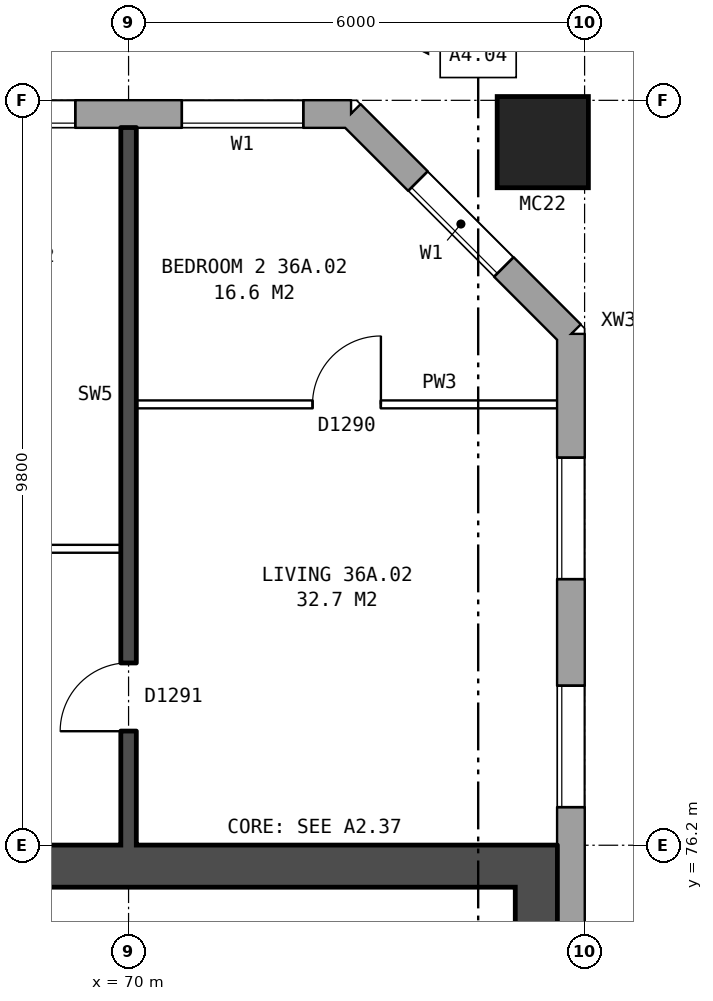
"""IFC4 building model, lengths in metres.
Left out: names, types, materials, properties, quantities, classifications, styles, units other than length and angle.
Written with IfcOpenShell. Run it as: python <this file> out.ifc"""

import sys

from ifc_helpers import new_model, si_unit, direction, frame, frame_2d, origin, origin_2d, place, context, subcontext, project, spatial, rectangle, hollow_rectangle, extrude, element, fill, save


model = new_model("IFC4")
c1 = context("Model", 3, precision=1e-05, world=origin(), true_north=direction((0.0, 1.0)))
c2 = subcontext(c1, "Body", "Model", "MODEL_VIEW")
j1 = project(units=[si_unit("LENGTHUNIT", "METRE"), si_unit("PLANEANGLEUNIT", "RADIAN")], contexts=[c1])
p1 = place(None, origin())
s1 = spatial("IfcSite", under=j1, at=p1, CompositionType="ELEMENT")
p2 = place(p1, origin())
s2 = spatial("IfcBuilding", under=s1, at=p2, CompositionType="ELEMENT")
p3 = place(p2, frame((0.0, 0.0, 129.9)))
s3 = spatial("IfcBuildingStorey", under=s2, at=p3, CompositionType="ELEMENT", Elevation=129.9)
p4 = place(p3, frame((75.45, 85.45, 0.0), z_axis=(0.0, 0.0, 1.0), x_axis=(1.0, 0.0, 0.0)))
e1 = element("IfcColumn", 1, at=p4, inside=s3, PredefinedType="COLUMN", context=c2, shape_type="SweptSolid", body=[
    extrude(hollow_rectangle(XDim=1.2, YDim=1.2, WallThickness=0.065, at=origin_2d()), origin(), (0.0, 0.0, 1.0), 3.1),
])
p5 = place(p3, frame((75.82, 57.075, 0.0), z_axis=(0.0, 0.0, 1.0), x_axis=(0.0, 1.0, 0.0)))
e2 = element("IfcWall", 2, at=p5, inside=s3, PredefinedType="STANDARD", context=c2, shape_type="SweptSolid", body=[
    extrude(rectangle(XDim=25.851, YDim=0.36, at=frame_2d((12.925, 0.0))), origin(), (0.0, 0.0, 1.0), 2.85),
])
p6 = place(p5, frame((1.625, 0.0, 0.8)))
e3 = element("IfcOpeningElement", 3, at=p6, cuts=e2, PredefinedType="OPENING", context=c2, shape_type="SweptSolid", body=[
    extrude(rectangle(XDim=1.6, YDim=1.8, at=frame_2d((0.8, 0.9))), frame((0.0, 0.19, 0.0), z_axis=(0.0, -1.0, 0.0), x_axis=(1.0, 0.0, 0.0)), (0.0, 0.0, 1.0), 0.38),
])
p7 = place(p5, frame((4.625, 0.0, 0.8)))
e4 = element("IfcOpeningElement", 4, at=p7, cuts=e2, PredefinedType="OPENING", context=c2, shape_type="SweptSolid", body=[
    extrude(rectangle(XDim=1.6, YDim=1.8, at=frame_2d((0.8, 0.9))), frame((0.0, 0.19, 0.0), z_axis=(0.0, -1.0, 0.0), x_axis=(1.0, 0.0, 0.0)), (0.0, 0.0, 1.0), 0.38),
])
p8 = place(p5, frame((19.625, 0.0, 0.8)))
e5 = element("IfcOpeningElement", 5, at=p8, cuts=e2, PredefinedType="OPENING", context=c2, shape_type="SweptSolid", body=[
    extrude(rectangle(XDim=1.6, YDim=1.8, at=frame_2d((0.8, 0.9))), frame((0.0, 0.19, 0.0), z_axis=(0.0, -1.0, 0.0), x_axis=(1.0, 0.0, 0.0)), (0.0, 0.0, 1.0), 0.38),
])
p9 = place(p5, frame((22.625, 0.0, 0.8)))
e6 = element("IfcOpeningElement", 6, at=p9, cuts=e2, PredefinedType="OPENING", context=c2, shape_type="SweptSolid", body=[
    extrude(rectangle(XDim=1.6, YDim=1.8, at=frame_2d((0.8, 0.9))), frame((0.0, 0.19, 0.0), z_axis=(0.0, -1.0, 0.0), x_axis=(1.0, 0.0, 0.0)), (0.0, 0.0, 1.0), 0.38),
])
p10 = place(p3, frame((75.82, 82.925, 0.0), z_axis=(0.0, 0.0, 1.0), x_axis=(-0.707106781187, 0.707106781187, 0.0)))
e7 = element("IfcWall", 7, at=p10, inside=s3, PredefinedType="STANDARD", context=c2, shape_type="SweptSolid", body=[
    extrude(rectangle(XDim=4.094, YDim=0.36, at=frame_2d((2.047, 0.0))), origin(), (0.0, 0.0, 1.0), 2.85),
])
p11 = place(p10, frame((1.247, 0.0, 0.8)))
e8 = element("IfcOpeningElement", 8, at=p11, cuts=e7, PredefinedType="OPENING", context=c2, shape_type="SweptSolid", body=[
    extrude(rectangle(XDim=1.6, YDim=1.8, at=frame_2d((0.8, 0.9))), frame((0.0, 0.19, 0.0), z_axis=(0.0, -1.0, 0.0), x_axis=(1.0, 0.0, 0.0)), (0.0, 0.0, 1.0), 0.38),
])
p12 = place(p3, frame((72.925, 85.82, 0.0), z_axis=(0.0, 0.0, 1.0), x_axis=(-1.0, 0.0, 0.0)))
e9 = element("IfcWall", 9, at=p12, inside=s3, PredefinedType="STANDARD", context=c2, shape_type="SweptSolid", body=[
    extrude(rectangle(XDim=43.101, YDim=0.36, at=frame_2d((21.55, 0.0))), origin(), (0.0, 0.0, 1.0), 2.85),
])
p13 = place(p12, frame((0.625, 0.0, 0.8)))
e10 = element("IfcOpeningElement", 10, at=p13, cuts=e9, PredefinedType="OPENING", context=c2, shape_type="SweptSolid", body=[
    extrude(rectangle(XDim=1.6, YDim=1.8, at=frame_2d((0.8, 0.9))), frame((0.0, 0.19, 0.0), z_axis=(0.0, -1.0, 0.0), x_axis=(1.0, 0.0, 0.0)), (0.0, 0.0, 1.0), 0.38),
])
p14 = place(p12, frame((3.625, 0.0, 0.8)))
e11 = element("IfcOpeningElement", 11, at=p14, cuts=e9, PredefinedType="OPENING", context=c2, shape_type="SweptSolid", body=[
    extrude(rectangle(XDim=1.6, YDim=1.8, at=frame_2d((0.8, 0.9))), frame((0.0, 0.19, 0.0), z_axis=(0.0, -1.0, 0.0), x_axis=(1.0, 0.0, 0.0)), (0.0, 0.0, 1.0), 0.38),
])
p15 = place(p12, frame((6.625, 0.0, 0.8)))
e12 = element("IfcOpeningElement", 12, at=p15, cuts=e9, PredefinedType="OPENING", context=c2, shape_type="SweptSolid", body=[
    extrude(rectangle(XDim=1.6, YDim=1.8, at=frame_2d((0.8, 0.9))), frame((0.0, 0.19, 0.0), z_axis=(0.0, -1.0, 0.0), x_axis=(1.0, 0.0, 0.0)), (0.0, 0.0, 1.0), 0.38),
])
p16 = place(p12, frame((10.175, 0.0, 0.15)))
e13 = element("IfcOpeningElement", 13, at=p16, cuts=e9, PredefinedType="OPENING", context=c2, shape_type="SweptSolid", body=[
    extrude(rectangle(XDim=0.6, YDim=0.9, at=frame_2d((0.3, 0.45))), frame((0.0, 0.19, 0.0), z_axis=(0.0, -1.0, 0.0), x_axis=(1.0, 0.0, 0.0)), (0.0, 0.0, 1.0), 0.38),
])
p17 = place(p12, frame((12.625, 0.0, 0.8)))
e14 = element("IfcOpeningElement", 14, at=p17, cuts=e9, PredefinedType="OPENING", context=c2, shape_type="SweptSolid", body=[
    extrude(rectangle(XDim=1.6, YDim=1.8, at=frame_2d((0.8, 0.9))), frame((0.0, 0.19, 0.0), z_axis=(0.0, -1.0, 0.0), x_axis=(1.0, 0.0, 0.0)), (0.0, 0.0, 1.0), 0.38),
])
p18 = place(p12, frame((15.625, 0.0, 0.8)))
e15 = element("IfcOpeningElement", 15, at=p18, cuts=e9, PredefinedType="OPENING", context=c2, shape_type="SweptSolid", body=[
    extrude(rectangle(XDim=1.6, YDim=1.8, at=frame_2d((0.8, 0.9))), frame((0.0, 0.19, 0.0), z_axis=(0.0, -1.0, 0.0), x_axis=(1.0, 0.0, 0.0)), (0.0, 0.0, 1.0), 0.38),
])
p19 = place(p12, frame((18.625, 0.0, 0.8)))
e16 = element("IfcOpeningElement", 16, at=p19, cuts=e9, PredefinedType="OPENING", context=c2, shape_type="SweptSolid", body=[
    extrude(rectangle(XDim=1.6, YDim=1.8, at=frame_2d((0.8, 0.9))), frame((0.0, 0.19, 0.0), z_axis=(0.0, -1.0, 0.0), x_axis=(1.0, 0.0, 0.0)), (0.0, 0.0, 1.0), 0.38),
])
p20 = place(p12, frame((21.625, 0.0, 0.8)))
e17 = element("IfcOpeningElement", 17, at=p20, cuts=e9, PredefinedType="OPENING", context=c2, shape_type="SweptSolid", body=[
    extrude(rectangle(XDim=1.6, YDim=1.8, at=frame_2d((0.8, 0.9))), frame((0.0, 0.19, 0.0), z_axis=(0.0, -1.0, 0.0), x_axis=(1.0, 0.0, 0.0)), (0.0, 0.0, 1.0), 0.38),
])
p21 = place(p12, frame((24.625, 0.0, 0.8)))
e18 = element("IfcOpeningElement", 18, at=p21, cuts=e9, PredefinedType="OPENING", context=c2, shape_type="SweptSolid", body=[
    extrude(rectangle(XDim=1.6, YDim=1.8, at=frame_2d((0.8, 0.9))), frame((0.0, 0.19, 0.0), z_axis=(0.0, -1.0, 0.0), x_axis=(1.0, 0.0, 0.0)), (0.0, 0.0, 1.0), 0.38),
])
p22 = place(p12, frame((27.625, 0.0, 0.8)))
e19 = element("IfcOpeningElement", 19, at=p22, cuts=e9, PredefinedType="OPENING", context=c2, shape_type="SweptSolid", body=[
    extrude(rectangle(XDim=1.6, YDim=1.8, at=frame_2d((0.8, 0.9))), frame((0.0, 0.19, 0.0), z_axis=(0.0, -1.0, 0.0), x_axis=(1.0, 0.0, 0.0)), (0.0, 0.0, 1.0), 0.38),
])
p23 = place(p12, frame((29.525, 0.0, 0.8)))
e20 = element("IfcOpeningElement", 20, at=p23, cuts=e9, PredefinedType="OPENING", context=c2, shape_type="SweptSolid", body=[
    extrude(rectangle(XDim=1.6, YDim=1.8, at=frame_2d((0.8, 0.9))), frame((0.0, 0.19, 0.0), z_axis=(0.0, -1.0, 0.0), x_axis=(1.0, 0.0, 0.0)), (0.0, 0.0, 1.0), 0.38),
])
p24 = place(p12, frame((33.375, 0.0, 1.7)))
e21 = element("IfcOpeningElement", 21, at=p24, cuts=e9, PredefinedType="OPENING", context=c2, shape_type="SweptSolid", body=[
    extrude(rectangle(XDim=0.8, YDim=0.9, at=frame_2d((0.4, 0.45))), frame((0.0, 0.19, 0.0), z_axis=(0.0, -1.0, 0.0), x_axis=(1.0, 0.0, 0.0)), (0.0, 0.0, 1.0), 0.38),
])
p25 = place(p12, frame((36.625, 0.0, 0.8)))
e22 = element("IfcOpeningElement", 22, at=p25, cuts=e9, PredefinedType="OPENING", context=c2, shape_type="SweptSolid", body=[
    extrude(rectangle(XDim=1.6, YDim=1.8, at=frame_2d((0.8, 0.9))), frame((0.0, 0.19, 0.0), z_axis=(0.0, -1.0, 0.0), x_axis=(1.0, 0.0, 0.0)), (0.0, 0.0, 1.0), 0.38),
])
p26 = place(p12, frame((39.625, 0.0, 0.8)))
e23 = element("IfcOpeningElement", 23, at=p26, cuts=e9, PredefinedType="OPENING", context=c2, shape_type="SweptSolid", body=[
    extrude(rectangle(XDim=1.6, YDim=1.8, at=frame_2d((0.8, 0.9))), frame((0.0, 0.19, 0.0), z_axis=(0.0, -1.0, 0.0), x_axis=(1.0, 0.0, 0.0)), (0.0, 0.0, 1.0), 0.38),
])
p27 = place(p12, frame((11.175, 0.0, 0.15)))
e24 = element("IfcOpeningElement", 24, at=p27, cuts=e9, PredefinedType="OPENING", context=c2, shape_type="SweptSolid", body=[
    extrude(rectangle(XDim=0.6, YDim=1.8, at=frame_2d((0.3, 0.9))), frame((0.0, 0.19, 0.0), z_axis=(0.0, -1.0, 0.0), x_axis=(1.0, 0.0, 0.0)), (0.0, 0.0, 1.0), 0.38),
])
p28 = place(p12, frame((31.425, 0.0, 0.8)))
e25 = element("IfcOpeningElement", 25, at=p28, cuts=e9, PredefinedType="OPENING", context=c2, shape_type="SweptSolid", body=[
    extrude(rectangle(XDim=0.8, YDim=0.9, at=frame_2d((0.4, 0.45))), frame((0.0, 0.19, 0.0), z_axis=(0.0, -1.0, 0.0), x_axis=(1.0, 0.0, 0.0)), (0.0, 0.0, 1.0), 0.38),
])
p29 = place(p12, frame((34.475, 0.0, 0.8)))
e26 = element("IfcOpeningElement", 26, at=p29, cuts=e9, PredefinedType="OPENING", context=c2, shape_type="SweptSolid", body=[
    extrude(rectangle(XDim=1.6, YDim=1.8, at=frame_2d((0.8, 0.9))), frame((0.0, 0.19, 0.0), z_axis=(0.0, -1.0, 0.0), x_axis=(1.0, 0.0, 0.0)), (0.0, 0.0, 1.0), 0.38),
])
p30 = place(p3, frame((75.365, 63.8, 0.0), z_axis=(0.0, 0.0, 1.0), x_axis=(0.0, 1.0, 0.0)))
e27 = element("IfcWall", 27, at=p30, inside=s3, PredefinedType="SHEAR", context=c2, shape_type="SweptSolid", body=[
    extrude(rectangle(XDim=12.4, YDim=0.55, at=frame_2d((6.2, 0.0))), origin(), (0.0, 0.0, 1.0), 2.85),
])
p31 = place(p3, frame((67.19, 75.925, 0.0), z_axis=(0.0, 0.0, 1.0), x_axis=(1.0, 0.0, 0.0)))
e28 = element("IfcWall", 28, at=p31, inside=s3, PredefinedType="SHEAR", context=c2, shape_type="SweptSolid", body=[
    extrude(rectangle(XDim=7.9, YDim=0.55, at=frame_2d((3.95, 0.0))), origin(), (0.0, 0.0, 1.0), 2.85),
])
p32 = place(p3, frame((64.1, 80.1, 0.0), z_axis=(0.0, 0.0, 1.0), x_axis=(1.0, 0.0, 0.0)))
e29 = element("IfcWall", 29, at=p32, inside=s3, PredefinedType="PARTITIONING", context=c2, shape_type="SweptSolid", body=[
    extrude(rectangle(XDim=5.8, YDim=0.1, at=frame_2d((2.9, 0.0))), origin(), (0.0, 0.0, 1.0), 2.85),
])
p33 = place(p32, frame((3.6, 0.0, 0.0)))
e30 = element("IfcOpeningElement", 30, at=p33, cuts=e29, PredefinedType="OPENING", context=c2, shape_type="SweptSolid", body=[
    extrude(rectangle(XDim=0.9, YDim=2.1, at=frame_2d((0.45, 1.05))), frame((0.0, 0.06, 0.0), z_axis=(0.0, -1.0, 0.0), x_axis=(1.0, 0.0, 0.0)), (0.0, 0.0, 1.0), 0.12),
])
p34 = place(p32, frame((0.7, 0.0, 0.0)))
e31 = element("IfcOpeningElement", 31, at=p34, cuts=e29, PredefinedType="OPENING", context=c2, shape_type="SweptSolid", body=[
    extrude(rectangle(XDim=0.9, YDim=2.1, at=frame_2d((0.45, 1.05))), frame((0.0, 0.06, 0.0), z_axis=(0.0, -1.0, 0.0), x_axis=(1.0, 0.0, 0.0)), (0.0, 0.0, 1.0), 0.12),
])
p35 = place(p3, frame((70.1, 82.0, 0.0), z_axis=(0.0, 0.0, 1.0), x_axis=(1.0, 0.0, 0.0)))
e32 = element("IfcWall", 32, at=p35, inside=s3, PredefinedType="PARTITIONING", context=c2, shape_type="SweptSolid", body=[
    extrude(rectangle(XDim=5.54, YDim=0.1, at=frame_2d((2.77, 0.0))), origin(), (0.0, 0.0, 1.0), 2.85),
])
p36 = place(p35, frame((2.32, 0.0, 0.0)))
e33 = element("IfcOpeningElement", 33, at=p36, cuts=e32, PredefinedType="OPENING", context=c2, shape_type="SweptSolid", body=[
    extrude(rectangle(XDim=0.9, YDim=2.1, at=frame_2d((0.45, 1.05))), frame((0.0, 0.06, 0.0), z_axis=(0.0, -1.0, 0.0), x_axis=(1.0, 0.0, 0.0)), (0.0, 0.0, 1.0), 0.12),
])
p37 = place(p3, frame((70.0, 76.2, 0.0), z_axis=(0.0, 0.0, 1.0), x_axis=(0.0, 1.0, 0.0)))
e34 = element("IfcWall", 34, at=p37, inside=s3, PredefinedType="SOLIDWALL", context=c2, shape_type="SweptSolid", body=[
    extrude(rectangle(XDim=9.44, YDim=0.2, at=frame_2d((4.72, 0.0))), origin(), (0.0, 0.0, 1.0), 2.85),
])
p38 = place(p37, frame((1.5, 0.0, 0.0)))
e35 = element("IfcOpeningElement", 35, at=p38, cuts=e34, PredefinedType="OPENING", context=c2, shape_type="SweptSolid", body=[
    extrude(rectangle(XDim=0.9, YDim=2.1, at=frame_2d((0.45, 1.05))), frame((0.0, 0.11, 0.0), z_axis=(0.0, -1.0, 0.0), x_axis=(1.0, 0.0, 0.0)), (0.0, 0.0, 1.0), 0.22),
])
p39 = place(p8, origin())
e36 = element("IfcWindow", 36, at=p39, inside=s3, PartitioningType="SINGLE_PANEL", PredefinedType="WINDOW", context=c2, shape_type="SweptSolid", body=[
    extrude(rectangle(XDim=1.6, YDim=1.8, at=frame_2d((0.8, 0.9))), frame((0.0, 0.15, 0.0), z_axis=(0.0, -1.0, 0.0), x_axis=(1.0, 0.0, 0.0)), (0.0, 0.0, 1.0), 0.06),
])
fill(e5, e36)
p40 = place(p9, origin())
e37 = element("IfcWindow", 37, at=p40, inside=s3, PartitioningType="SINGLE_PANEL", PredefinedType="WINDOW", context=c2, shape_type="SweptSolid", body=[
    extrude(rectangle(XDim=1.6, YDim=1.8, at=frame_2d((0.8, 0.9))), frame((0.0, 0.15, 0.0), z_axis=(0.0, -1.0, 0.0), x_axis=(1.0, 0.0, 0.0)), (0.0, 0.0, 1.0), 0.06),
])
fill(e6, e37)
p41 = place(p11, origin())
e38 = element("IfcWindow", 38, at=p41, inside=s3, PartitioningType="SINGLE_PANEL", PredefinedType="WINDOW", context=c2, shape_type="SweptSolid", body=[
    extrude(rectangle(XDim=1.6, YDim=1.8, at=frame_2d((0.8, 0.9))), frame((0.0, 0.15, 0.0), z_axis=(0.0, -1.0, 0.0), x_axis=(1.0, 0.0, 0.0)), (0.0, 0.0, 1.0), 0.06),
])
fill(e8, e38)
p42 = place(p13, origin())
e39 = element("IfcWindow", 39, at=p42, inside=s3, PartitioningType="SINGLE_PANEL", PredefinedType="WINDOW", context=c2, shape_type="SweptSolid", body=[
    extrude(rectangle(XDim=1.6, YDim=1.8, at=frame_2d((0.8, 0.9))), frame((0.0, 0.15, 0.0), z_axis=(0.0, -1.0, 0.0), x_axis=(1.0, 0.0, 0.0)), (0.0, 0.0, 1.0), 0.06),
])
fill(e10, e39)
p43 = place(p14, origin())
e40 = element("IfcWindow", 40, at=p43, inside=s3, PartitioningType="SINGLE_PANEL", PredefinedType="WINDOW", context=c2, shape_type="SweptSolid", body=[
    extrude(rectangle(XDim=1.6, YDim=1.8, at=frame_2d((0.8, 0.9))), frame((0.0, 0.15, 0.0), z_axis=(0.0, -1.0, 0.0), x_axis=(1.0, 0.0, 0.0)), (0.0, 0.0, 1.0), 0.06),
])
fill(e11, e40)
p44 = place(p36, origin())
e41 = element("IfcDoor", 41, at=p44, inside=s3, OperationType="SINGLE_SWING_RIGHT", PredefinedType="DOOR", context=c2, shape_type="SweptSolid", body=[
    extrude(rectangle(XDim=0.9, YDim=2.1, at=frame_2d((0.45, 1.05))), frame((0.0, 0.025, 0.0), z_axis=(0.0, -1.0, 0.0), x_axis=(1.0, 0.0, 0.0)), (0.0, 0.0, 1.0), 0.05),
])
fill(e33, e41)
p45 = place(p38, origin())
e42 = element("IfcDoor", 42, at=p45, inside=s3, OperationType="SINGLE_SWING_LEFT", PredefinedType="DOOR", context=c2, shape_type="SweptSolid", body=[
    extrude(rectangle(XDim=0.9, YDim=2.1, at=frame_2d((0.45, 1.05))), frame((0.0, 0.025, 0.0), z_axis=(0.0, -1.0, 0.0), x_axis=(1.0, 0.0, 0.0)), (0.0, 0.0, 1.0), 0.05),
])
fill(e35, e42)
save(model, sys.argv[1])
